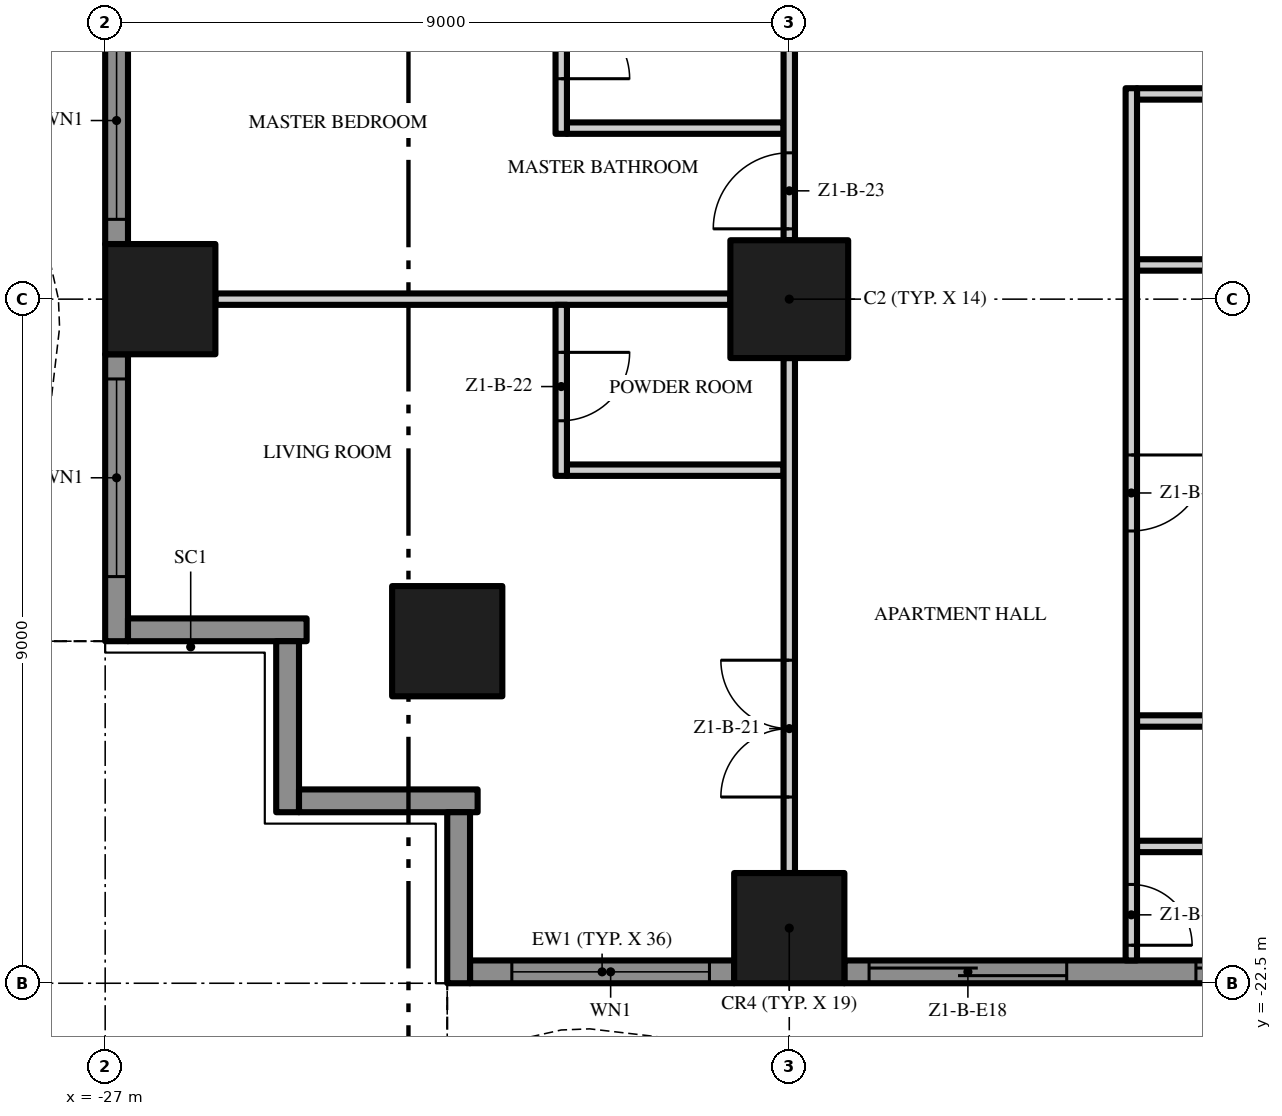
"""IFC4 building model, lengths in metres.
Left out: names, types, materials, properties, quantities, classifications, styles, units other than length and angle.
Written with IfcOpenShell. Run it as: python <this file> out.ifc"""

import sys

from ifc_helpers import new_model, si_unit, direction, frame, frame_2d, origin, origin_2d, place, context, subcontext, project, spatial, polyline, rectangle, outline, extrude, element, fill, save


model = new_model("IFC4")
c1 = context("Model", 3, precision=1e-05, world=origin(), true_north=direction((0.0, 1.0)))
c2 = subcontext(c1, "Body", "Model", "MODEL_VIEW")
j1 = project(units=[si_unit("LENGTHUNIT", "METRE"), si_unit("PLANEANGLEUNIT", "RADIAN")], contexts=[c1])
p1 = place(None, origin())
s1 = spatial("IfcSite", under=j1, at=p1, CompositionType="ELEMENT")
p2 = place(p1, origin())
s2 = spatial("IfcBuilding", under=s1, at=p2, CompositionType="ELEMENT")
p3 = place(p2, frame((0.0, 0.0, 34.0)))
s3 = spatial("IfcBuildingStorey", under=s2, at=p3, CompositionType="ELEMENT", Elevation=34.0)
p4 = place(p3, frame((-18.0, -13.5, 0.0), z_axis=(0.0, 0.0, 1.0), x_axis=(1.0, 0.0, 0.0)))
e1 = element("IfcColumn", 1, at=p4, inside=s3, PredefinedType="COLUMN", context=c2, shape_type="SweptSolid", body=[
    extrude(rectangle(XDim=1.55, YDim=1.55, at=origin_2d()), origin(), (0.0, 0.0, 1.0), 3.5),
])
for number, where, z_axis, x_axis in (
    (2, (-18.0, -21.775, 0.0), (0.0, 0.0, 1.0), (1.0, 0.0, 0.0)),
    (3, (-26.275, -13.5, 0.0), (0.0, 0.0, 1.0), (1.0, 0.0, 0.0)),
    (4, (-22.5, -18.0, 0.0), (0.0, 0.0, 1.0), (1.0, 0.0, 0.0)),
):
    element("IfcColumn", number, at=place(p3, frame(where, z_axis=z_axis, x_axis=x_axis)), inside=s3, PredefinedType="COLUMN", context=c2, shape_type="SweptSolid", body=[
        extrude(rectangle(XDim=1.45, YDim=1.45, at=origin_2d()), origin(), (0.0, 0.0, 1.0), 3.5),
    ])
p5 = place(p3, frame((-18.725, -22.35, 0.0), z_axis=(0.0, 0.0, 1.0), x_axis=(-1.0, 0.0, 0.0)))
e5 = element("IfcWall", 5, at=p5, inside=s3, PredefinedType="SOLIDWALL", context=c2, shape_type="SweptSolid", body=[
    extrude(rectangle(XDim=3.475, YDim=0.3, at=frame_2d((1.738, 0.0))), origin(), (0.0, 0.0, 1.0), 3.5),
])
p6 = place(p5, frame((0.325, 0.0, 0.45)))
e6 = element("IfcOpeningElement", 6, at=p6, cuts=e5, PredefinedType="OPENING", context=c2, shape_type="SweptSolid", body=[
    extrude(rectangle(XDim=2.6, YDim=2.65, at=frame_2d((1.3, 1.325))), frame((0.0, 0.16, 0.0), z_axis=(0.0, -1.0, 0.0), x_axis=(1.0, 0.0, 0.0)), (0.0, 0.0, 1.0), 0.32),
])
p7 = place(p3, frame((-9.725, -22.35, 0.0), z_axis=(0.0, 0.0, 1.0), x_axis=(-1.0, 0.0, 0.0)))
e7 = element("IfcWall", 7, at=p7, inside=s3, PredefinedType="SOLIDWALL", context=c2, shape_type="SweptSolid", body=[
    extrude(rectangle(XDim=7.55, YDim=0.3, at=frame_2d((3.775, 0.0))), origin(), (0.0, 0.0, 1.0), 3.5),
])
p8 = place(p7, frame((4.625, 0.0, 0.0)))
e8 = element("IfcOpeningElement", 8, at=p8, cuts=e7, PredefinedType="OPENING", context=c2, shape_type="SweptSolid", body=[
    extrude(rectangle(XDim=2.6, YDim=2.4, at=frame_2d((1.3, 1.2))), frame((0.0, 0.16, 0.0), z_axis=(0.0, -1.0, 0.0), x_axis=(1.0, 0.0, 0.0)), (0.0, 0.0, 1.0), 0.32),
])
p9 = place(p7, frame((0.325, 0.0, 0.0)))
e9 = element("IfcOpeningElement", 9, at=p9, cuts=e7, PredefinedType="OPENING", context=c2, shape_type="SweptSolid", body=[
    extrude(rectangle(XDim=2.6, YDim=2.4, at=frame_2d((1.3, 1.2))), frame((0.0, 0.16, 0.0), z_axis=(0.0, -1.0, 0.0), x_axis=(1.0, 0.0, 0.0)), (0.0, 0.0, 1.0), 0.32),
])
p10 = place(p3, frame((-26.85, -12.775, 0.0), z_axis=(0.0, 0.0, 1.0), x_axis=(0.0, 1.0, 0.0)))
e10 = element("IfcWall", 10, at=p10, inside=s3, PredefinedType="SOLIDWALL", context=c2, shape_type="SweptSolid", body=[
    extrude(rectangle(XDim=7.55, YDim=0.3, at=frame_2d((3.775, 0.0))), origin(), (0.0, 0.0, 1.0), 3.5),
])
p11 = place(p10, frame((4.625, 0.0, 0.0)))
e11 = element("IfcOpeningElement", 11, at=p11, cuts=e10, PredefinedType="OPENING", context=c2, shape_type="SweptSolid", body=[
    extrude(rectangle(XDim=2.6, YDim=2.4, at=frame_2d((1.3, 1.2))), frame((0.0, 0.16, 0.0), z_axis=(0.0, -1.0, 0.0), x_axis=(1.0, 0.0, 0.0)), (0.0, 0.0, 1.0), 0.32),
])
p12 = place(p10, frame((0.325, 0.0, 0.45)))
e12 = element("IfcOpeningElement", 12, at=p12, cuts=e10, PredefinedType="OPENING", context=c2, shape_type="SweptSolid", body=[
    extrude(rectangle(XDim=2.6, YDim=2.65, at=frame_2d((1.3, 1.325))), frame((0.0, 0.16, 0.0), z_axis=(0.0, -1.0, 0.0), x_axis=(1.0, 0.0, 0.0)), (0.0, 0.0, 1.0), 0.32),
])
p13 = place(p3, frame((-26.85, -18.0, 0.0), z_axis=(0.0, 0.0, 1.0), x_axis=(0.0, 1.0, 0.0)))
e13 = element("IfcWall", 13, at=p13, inside=s3, PredefinedType="SOLIDWALL", context=c2, shape_type="SweptSolid", body=[
    extrude(rectangle(XDim=3.775, YDim=0.3, at=frame_2d((1.887, 0.0))), origin(), (0.0, 0.0, 1.0), 3.5),
])
p14 = place(p13, frame((0.85, 0.0, 0.45)))
e14 = element("IfcOpeningElement", 14, at=p14, cuts=e13, PredefinedType="OPENING", context=c2, shape_type="SweptSolid", body=[
    extrude(rectangle(XDim=2.6, YDim=2.65, at=frame_2d((1.3, 1.325))), frame((0.0, 0.16, 0.0), z_axis=(0.0, -1.0, 0.0), x_axis=(1.0, 0.0, 0.0)), (0.0, 0.0, 1.0), 0.32),
])
p15 = place(p3, frame((-24.35, -17.85, 0.0), z_axis=(0.0, 0.0, 1.0), x_axis=(-1.0, 0.0, 0.0)))
e15 = element("IfcWall", 15, at=p15, inside=s3, PredefinedType="SOLIDWALL", context=c2, shape_type="SweptSolid", body=[
    extrude(rectangle(XDim=2.35, YDim=0.3, at=frame_2d((1.175, 0.0))), origin(), (0.0, 0.0, 1.0), 3.5),
])
p16 = place(p3, frame((-24.6, -20.25, 0.0), z_axis=(0.0, 0.0, 1.0), x_axis=(0.0, 1.0, 0.0)))
e16 = element("IfcWall", 16, at=p16, inside=s3, PredefinedType="SOLIDWALL", context=c2, shape_type="SweptSolid", body=[
    extrude(rectangle(XDim=2.25, YDim=0.3, at=frame_2d((1.125, 0.0))), origin(), (0.0, 0.0, 1.0), 3.5),
])
p17 = place(p3, frame((-22.1, -20.1, 0.0), z_axis=(0.0, 0.0, 1.0), x_axis=(-1.0, 0.0, 0.0)))
e17 = element("IfcWall", 17, at=p17, inside=s3, PredefinedType="SOLIDWALL", context=c2, shape_type="SweptSolid", body=[
    extrude(rectangle(XDim=2.35, YDim=0.3, at=frame_2d((1.175, 0.0))), origin(), (0.0, 0.0, 1.0), 3.5),
])
p18 = place(p3, frame((-22.35, -22.5, 0.0), z_axis=(0.0, 0.0, 1.0), x_axis=(0.0, 1.0, 0.0)))
e18 = element("IfcWall", 18, at=p18, inside=s3, PredefinedType="SOLIDWALL", context=c2, shape_type="SweptSolid", body=[
    extrude(rectangle(XDim=2.25, YDim=0.3, at=frame_2d((1.125, 0.0))), origin(), (0.0, 0.0, 1.0), 3.5),
])
p19 = place(p3, origin())
e19 = element("IfcWall", 19, at=p19, inside=s3, PredefinedType="USERDEFINED", context=c2, shape_type="SweptSolid", body=[
    extrude(outline(polyline([(-22.5, -23.451), (-21.0, -23.115), (-20.625, -23.1), (-19.5, -23.231), (-18.0, -23.755), (-16.5, -24.488), (-15.0, -25.149), (-13.5, -25.485), (-13.125, -25.5), (-12.0, -25.369), (-10.5, -24.845), (-9.0, -24.112), (-7.5, -23.451), (-6.0, -23.115), (-5.625, -23.1), (-4.5, -23.231), (-3.0, -23.755), (-1.5, -24.488), (0.0, -25.149), (1.5, -25.485), (1.875, -25.5), (3.0, -25.369), (4.5, -24.845), (6.0, -24.112), (7.5, -23.451), (9.0, -23.115), (9.375, -23.1), (10.5, -23.231), (12.0, -23.755), (13.5, -24.488), (15.0, -25.149), (16.5, -25.485), (16.875, -25.5), (18.0, -25.369), (19.5, -24.845), (21.0, -24.112), (22.5, -23.451), (22.399, -23.223), (20.895, -23.885), (19.404, -24.614), (17.944, -25.124), (16.865, -25.249), (16.533, -25.236), (15.079, -24.91), (13.605, -24.261), (12.096, -23.524), (10.556, -22.986), (9.385, -22.849), (8.967, -22.866), (7.421, -23.213), (5.895, -23.885), (4.404, -24.614), (2.944, -25.124), (1.865, -25.249), (1.533, -25.236), (0.079, -24.91), (-1.395, -24.261), (-2.904, -23.524), (-4.444, -22.986), (-5.615, -22.849), (-6.033, -22.866), (-7.579, -23.213), (-9.105, -23.885), (-10.596, -24.614), (-12.056, -25.124), (-13.135, -25.249), (-13.467, -25.236), (-14.921, -24.91), (-16.395, -24.261), (-17.904, -23.524), (-19.444, -22.986), (-20.615, -22.849), (-21.033, -22.866), (-22.555, -23.208), (-22.5, -23.451)])), origin(), (0.0, 0.0, 1.0), 0.9),
])
p20 = place(p3, origin())
e20 = element("IfcWall", 20, at=p20, inside=s3, PredefinedType="USERDEFINED", context=c2, shape_type="SweptSolid", body=[
    extrude(outline(polyline([(-27.951, 18.0), (-27.615, 16.5), (-27.6, 16.125), (-27.731, 15.0), (-28.255, 13.5), (-28.988, 12.0), (-29.649, 10.5), (-29.985, 9.0), (-30.0, 8.625), (-29.869, 7.5), (-29.345, 6.0), (-28.612, 4.5), (-27.951, 3.0), (-27.615, 1.5), (-27.6, 1.125), (-27.731, 0.0), (-28.255, -1.5), (-28.988, -3.0), (-29.649, -4.5), (-29.985, -6.0), (-30.0, -6.375), (-29.869, -7.5), (-29.345, -9.0), (-28.612, -10.5), (-27.951, -12.0), (-27.615, -13.5), (-27.6, -13.875), (-27.731, -15.0), (-28.255, -16.5), (-28.988, -18.0), (-28.763, -18.11), (-28.024, -16.596), (-27.486, -15.056), (-27.349, -13.885), (-27.366, -13.467), (-27.713, -11.921), (-28.385, -10.395), (-29.114, -8.904), (-29.624, -7.444), (-29.749, -6.365), (-29.736, -6.033), (-29.41, -4.579), (-28.761, -3.105), (-28.024, -1.596), (-27.486, -0.056), (-27.349, 1.115), (-27.366, 1.533), (-27.713, 3.079), (-28.385, 4.605), (-29.114, 6.096), (-29.624, 7.556), (-29.749, 8.635), (-29.736, 8.967), (-29.41, 10.421), (-28.761, 11.895), (-28.024, 13.404), (-27.486, 14.944), (-27.349, 16.115), (-27.366, 16.533), (-27.708, 18.055), (-27.951, 18.0)])), origin(), (0.0, 0.0, 1.0), 0.9),
])
for number, where, z_axis, x_axis in (
    (21, (-13.425, -20.7, 0.0), (0.0, 0.0, 1.0), (1.0, 0.0, 0.0)),
    (22, (-13.425, -19.05, 0.0), (0.0, 0.0, 1.0), (1.0, 0.0, 0.0)),
):
    element("IfcWall", number, at=place(p3, frame(where, z_axis=z_axis, x_axis=x_axis)), inside=s3, PredefinedType="PARTITIONING", context=c2, shape_type="SweptSolid", body=[
        extrude(rectangle(XDim=4.35, YDim=0.15, at=frame_2d((2.175, 0.0))), origin(), (0.0, 0.0, 1.0), 3.5),
    ])
p21 = place(p3, frame((-20.925, -15.75, 0.0), z_axis=(0.0, 0.0, 1.0), x_axis=(1.0, 0.0, 0.0)))
e23 = element("IfcWall", 23, at=p21, inside=s3, PredefinedType="PARTITIONING", context=c2, shape_type="SweptSolid", body=[
    extrude(rectangle(XDim=2.85, YDim=0.15, at=frame_2d((1.425, 0.0))), origin(), (0.0, 0.0, 1.0), 3.5),
])
p22 = place(p3, frame((-25.55, -13.5, 0.0), z_axis=(0.0, 0.0, 1.0), x_axis=(1.0, 0.0, 0.0)))
e24 = element("IfcWall", 24, at=p22, inside=s3, PredefinedType="PARTITIONING", context=c2, shape_type="SweptSolid", body=[
    extrude(rectangle(XDim=6.775, YDim=0.15, at=frame_2d((3.388, 0.0))), origin(), (0.0, 0.0, 1.0), 3.5),
])
p23 = place(p3, frame((-13.425, -13.05, 0.0), z_axis=(0.0, 0.0, 1.0), x_axis=(1.0, 0.0, 0.0)))
e25 = element("IfcWall", 25, at=p23, inside=s3, PredefinedType="PARTITIONING", context=c2, shape_type="SweptSolid", body=[
    extrude(rectangle(XDim=3.65, YDim=0.15, at=frame_2d((1.825, 0.0))), origin(), (0.0, 0.0, 1.0), 3.5),
])
p24 = place(p3, frame((-20.925, -11.25, 0.0), z_axis=(0.0, 0.0, 1.0), x_axis=(1.0, 0.0, 0.0)))
e26 = element("IfcWall", 26, at=p24, inside=s3, PredefinedType="PARTITIONING", context=c2, shape_type="SweptSolid", body=[
    extrude(rectangle(XDim=2.85, YDim=0.15, at=frame_2d((1.425, 0.0))), origin(), (0.0, 0.0, 1.0), 3.5),
])
p25 = place(p3, frame((-9.075, -10.8, 0.0), z_axis=(0.0, 0.0, 1.0), x_axis=(-1.0, 0.0, 0.0)))
e27 = element("IfcWall", 27, at=p25, inside=s3, PredefinedType="PARTITIONING", context=c2, shape_type="SweptSolid", body=[
    extrude(rectangle(XDim=4.35, YDim=0.15, at=frame_2d((2.175, 0.0))), origin(), (0.0, 0.0, 1.0), 3.5),
])
p26 = place(p25, frame((1.7, 0.0, 0.0)))
e28 = element("IfcOpeningElement", 28, at=p26, cuts=e27, PredefinedType="OPENING", context=c2, shape_type="SweptSolid", body=[
    extrude(rectangle(XDim=0.9, YDim=2.1, at=frame_2d((0.45, 1.05))), frame((0.0, 0.085, 0.0), z_axis=(0.0, -1.0, 0.0), x_axis=(1.0, 0.0, 0.0)), (0.0, 0.0, 1.0), 0.17),
])
p27 = place(p3, frame((-21.0, -13.575, 0.0), z_axis=(0.0, 0.0, 1.0), x_axis=(0.0, -1.0, 0.0)))
e29 = element("IfcWall", 29, at=p27, inside=s3, PredefinedType="PARTITIONING", context=c2, shape_type="SweptSolid", body=[
    extrude(rectangle(XDim=2.25, YDim=0.15, at=frame_2d((1.125, 0.0))), origin(), (0.0, 0.0, 1.0), 3.5),
])
p28 = place(p27, frame((0.625, 0.0, 0.0)))
e30 = element("IfcOpeningElement", 30, at=p28, cuts=e29, PredefinedType="OPENING", context=c2, shape_type="SweptSolid", body=[
    extrude(rectangle(XDim=0.9, YDim=2.1, at=frame_2d((0.45, 1.05))), frame((0.0, 0.085, 0.0), z_axis=(0.0, -1.0, 0.0), x_axis=(1.0, 0.0, 0.0)), (0.0, 0.0, 1.0), 0.17),
])
p29 = place(p3, frame((-21.0, -6.675, 0.0), z_axis=(0.0, 0.0, 1.0), x_axis=(0.0, -1.0, 0.0)))
e31 = element("IfcWall", 31, at=p29, inside=s3, PredefinedType="PARTITIONING", context=c2, shape_type="SweptSolid", body=[
    extrude(rectangle(XDim=4.65, YDim=0.15, at=frame_2d((2.325, 0.0))), origin(), (0.0, 0.0, 1.0), 3.5),
])
p30 = place(p29, frame((3.025, 0.0, 0.0)))
e32 = element("IfcOpeningElement", 32, at=p30, cuts=e31, PredefinedType="OPENING", context=c2, shape_type="SweptSolid", body=[
    extrude(rectangle(XDim=0.9, YDim=2.1, at=frame_2d((0.45, 1.05))), frame((0.0, 0.085, 0.0), z_axis=(0.0, -1.0, 0.0), x_axis=(1.0, 0.0, 0.0)), (0.0, 0.0, 1.0), 0.17),
])
p31 = place(p29, frame((0.725, 0.0, 0.0)))
e33 = element("IfcOpeningElement", 33, at=p31, cuts=e31, PredefinedType="OPENING", context=c2, shape_type="SweptSolid", body=[
    extrude(rectangle(XDim=0.9, YDim=2.1, at=frame_2d((0.45, 1.05))), frame((0.0, 0.085, 0.0), z_axis=(0.0, -1.0, 0.0), x_axis=(1.0, 0.0, 0.0)), (0.0, 0.0, 1.0), 0.17),
])
p32 = place(p3, frame((-18.0, -21.05, 0.0), z_axis=(0.0, 0.0, 1.0), x_axis=(0.0, 1.0, 0.0)))
e34 = element("IfcWall", 34, at=p32, inside=s3, PredefinedType="PARTITIONING", context=c2, shape_type="SweptSolid", body=[
    extrude(rectangle(XDim=6.775, YDim=0.15, at=frame_2d((3.388, 0.0))), origin(), (0.0, 0.0, 1.0), 3.5),
])
p33 = place(p32, frame((1.0, 0.0, 0.0)))
e35 = element("IfcOpeningElement", 35, at=p33, cuts=e34, PredefinedType="OPENING", context=c2, shape_type="SweptSolid", body=[
    extrude(rectangle(XDim=1.8, YDim=2.4, at=frame_2d((0.9, 1.2))), frame((0.0, 0.085, 0.0), z_axis=(0.0, -1.0, 0.0), x_axis=(1.0, 0.0, 0.0)), (0.0, 0.0, 1.0), 0.17),
])
p34 = place(p3, frame((-18.0, -12.725, 0.0), z_axis=(0.0, 0.0, 1.0), x_axis=(0.0, 1.0, 0.0)))
e36 = element("IfcWall", 36, at=p34, inside=s3, PredefinedType="PARTITIONING", context=c2, shape_type="SweptSolid", body=[
    extrude(rectangle(XDim=7.45, YDim=0.15, at=frame_2d((3.725, 0.0))), origin(), (0.0, 0.0, 1.0), 3.5),
])
p35 = place(p34, frame((0.15, 0.0, 0.0)))
e37 = element("IfcOpeningElement", 37, at=p35, cuts=e36, PredefinedType="OPENING", context=c2, shape_type="SweptSolid", body=[
    extrude(rectangle(XDim=1.0, YDim=2.4, at=frame_2d((0.5, 1.2))), frame((0.0, 0.085, 0.0), z_axis=(0.0, -1.0, 0.0), x_axis=(1.0, 0.0, 0.0)), (0.0, 0.0, 1.0), 0.17),
])
p36 = place(p34, frame((6.3, 0.0, 0.0)))
e38 = element("IfcOpeningElement", 38, at=p36, cuts=e36, PredefinedType="OPENING", context=c2, shape_type="SweptSolid", body=[
    extrude(rectangle(XDim=1.0, YDim=2.4, at=frame_2d((0.5, 1.2))), frame((0.0, 0.085, 0.0), z_axis=(0.0, -1.0, 0.0), x_axis=(1.0, 0.0, 0.0)), (0.0, 0.0, 1.0), 0.17),
])
p37 = place(p3, frame((-13.5, -10.725, 0.0), z_axis=(0.0, 0.0, 1.0), x_axis=(0.0, -1.0, 0.0)))
e39 = element("IfcWall", 39, at=p37, inside=s3, PredefinedType="PARTITIONING", context=c2, shape_type="SweptSolid", body=[
    extrude(rectangle(XDim=11.475, YDim=0.15, at=frame_2d((5.737, 0.0))), origin(), (0.0, 0.0, 1.0), 3.5),
])
p38 = place(p37, frame((10.475, 0.0, 0.0)))
e40 = element("IfcOpeningElement", 40, at=p38, cuts=e39, PredefinedType="OPENING", context=c2, shape_type="SweptSolid", body=[
    extrude(rectangle(XDim=0.8, YDim=2.0, at=frame_2d((0.4, 1.0))), frame((0.0, 0.085, 0.0), z_axis=(0.0, -1.0, 0.0), x_axis=(1.0, 0.0, 0.0)), (0.0, 0.0, 1.0), 0.17),
])
p39 = place(p37, frame((4.825, 0.0, 0.0)))
e41 = element("IfcOpeningElement", 41, at=p39, cuts=e39, PredefinedType="OPENING", context=c2, shape_type="SweptSolid", body=[
    extrude(rectangle(XDim=1.0, YDim=2.4, at=frame_2d((0.5, 1.2))), frame((0.0, 0.085, 0.0), z_axis=(0.0, -1.0, 0.0), x_axis=(1.0, 0.0, 0.0)), (0.0, 0.0, 1.0), 0.17),
])
p40 = place(p6, origin())
e42 = element("IfcWindow", 42, at=p40, inside=s3, PartitioningType="SINGLE_PANEL", PredefinedType="WINDOW", context=c2, shape_type="SweptSolid", body=[
    extrude(rectangle(XDim=2.6, YDim=2.65, at=frame_2d((1.3, 1.325))), frame((0.0, 0.03, 0.0), z_axis=(0.0, -1.0, 0.0), x_axis=(1.0, 0.0, 0.0)), (0.0, 0.0, 1.0), 0.06),
])
fill(e6, e42)
p41 = place(p8, origin())
e43 = element("IfcDoor", 43, at=p41, inside=s3, OperationType="SINGLE_SWING_LEFT", PredefinedType="DOOR", context=c2, shape_type="SweptSolid", body=[
    extrude(rectangle(XDim=2.6, YDim=2.4, at=frame_2d((1.3, 1.2))), frame((0.0, 0.025, 0.0), z_axis=(0.0, -1.0, 0.0), x_axis=(1.0, 0.0, 0.0)), (0.0, 0.0, 1.0), 0.05),
])
fill(e8, e43)
p42 = place(p9, origin())
e44 = element("IfcDoor", 44, at=p42, inside=s3, OperationType="SINGLE_SWING_LEFT", PredefinedType="DOOR", context=c2, shape_type="SweptSolid", body=[
    extrude(rectangle(XDim=2.6, YDim=2.4, at=frame_2d((1.3, 1.2))), frame((0.0, 0.025, 0.0), z_axis=(0.0, -1.0, 0.0), x_axis=(1.0, 0.0, 0.0)), (0.0, 0.0, 1.0), 0.05),
])
fill(e9, e44)
p43 = place(p12, origin())
e45 = element("IfcWindow", 45, at=p43, inside=s3, PartitioningType="SINGLE_PANEL", PredefinedType="WINDOW", context=c2, shape_type="SweptSolid", body=[
    extrude(rectangle(XDim=2.6, YDim=2.65, at=frame_2d((1.3, 1.325))), frame((0.0, 0.03, 0.0), z_axis=(0.0, -1.0, 0.0), x_axis=(1.0, 0.0, 0.0)), (0.0, 0.0, 1.0), 0.06),
])
fill(e12, e45)
p44 = place(p14, origin())
e46 = element("IfcWindow", 46, at=p44, inside=s3, PartitioningType="SINGLE_PANEL", PredefinedType="WINDOW", context=c2, shape_type="SweptSolid", body=[
    extrude(rectangle(XDim=2.6, YDim=2.65, at=frame_2d((1.3, 1.325))), frame((0.0, 0.03, 0.0), z_axis=(0.0, -1.0, 0.0), x_axis=(1.0, 0.0, 0.0)), (0.0, 0.0, 1.0), 0.06),
])
fill(e14, e46)
p45 = place(p38, origin())
e47 = element("IfcDoor", 47, at=p45, inside=s3, OperationType="SINGLE_SWING_RIGHT", PredefinedType="DOOR", context=c2, shape_type="SweptSolid", body=[
    extrude(rectangle(XDim=0.8, YDim=2.0, at=frame_2d((0.4, 1.0))), frame((0.0, 0.025, 0.0), z_axis=(0.0, -1.0, 0.0), x_axis=(1.0, 0.0, 0.0)), (0.0, 0.0, 1.0), 0.05),
])
fill(e40, e47)
p46 = place(p39, origin())
e48 = element("IfcDoor", 48, at=p46, inside=s3, OperationType="SINGLE_SWING_LEFT", PredefinedType="DOOR", context=c2, shape_type="SweptSolid", body=[
    extrude(rectangle(XDim=1.0, YDim=2.4, at=frame_2d((0.5, 1.2))), frame((0.0, 0.025, 0.0), z_axis=(0.0, -1.0, 0.0), x_axis=(1.0, 0.0, 0.0)), (0.0, 0.0, 1.0), 0.05),
])
fill(e41, e48)
p47 = place(p33, origin())
e49 = element("IfcDoor", 49, at=p47, inside=s3, OperationType="DOUBLE_DOOR_SINGLE_SWING", PredefinedType="DOOR", context=c2, shape_type="SweptSolid", body=[
    extrude(rectangle(XDim=1.8, YDim=2.4, at=frame_2d((0.9, 1.2))), frame((0.0, 0.025, 0.0), z_axis=(0.0, -1.0, 0.0), x_axis=(1.0, 0.0, 0.0)), (0.0, 0.0, 1.0), 0.05),
])
fill(e35, e49)
p48 = place(p28, origin())
e50 = element("IfcDoor", 50, at=p48, inside=s3, OperationType="SINGLE_SWING_LEFT", PredefinedType="DOOR", context=c2, shape_type="SweptSolid", body=[
    extrude(rectangle(XDim=0.9, YDim=2.1, at=frame_2d((0.45, 1.05))), frame((0.0, 0.025, 0.0), z_axis=(0.0, -1.0, 0.0), x_axis=(1.0, 0.0, 0.0)), (0.0, 0.0, 1.0), 0.05),
])
fill(e30, e50)
p49 = place(p35, origin())
e51 = element("IfcDoor", 51, at=p49, inside=s3, OperationType="SINGLE_SWING_LEFT", PredefinedType="DOOR", context=c2, shape_type="SweptSolid", body=[
    extrude(rectangle(XDim=1.0, YDim=2.4, at=frame_2d((0.5, 1.2))), frame((0.0, 0.025, 0.0), z_axis=(0.0, -1.0, 0.0), x_axis=(1.0, 0.0, 0.0)), (0.0, 0.0, 1.0), 0.05),
])
fill(e37, e51)
p50 = place(p30, origin())
e52 = element("IfcDoor", 52, at=p50, inside=s3, OperationType="SINGLE_SWING_RIGHT", PredefinedType="DOOR", context=c2, shape_type="SweptSolid", body=[
    extrude(rectangle(XDim=0.9, YDim=2.1, at=frame_2d((0.45, 1.05))), frame((0.0, 0.025, 0.0), z_axis=(0.0, -1.0, 0.0), x_axis=(1.0, 0.0, 0.0)), (0.0, 0.0, 1.0), 0.05),
])
fill(e32, e52)
save(model, sys.argv[1])
